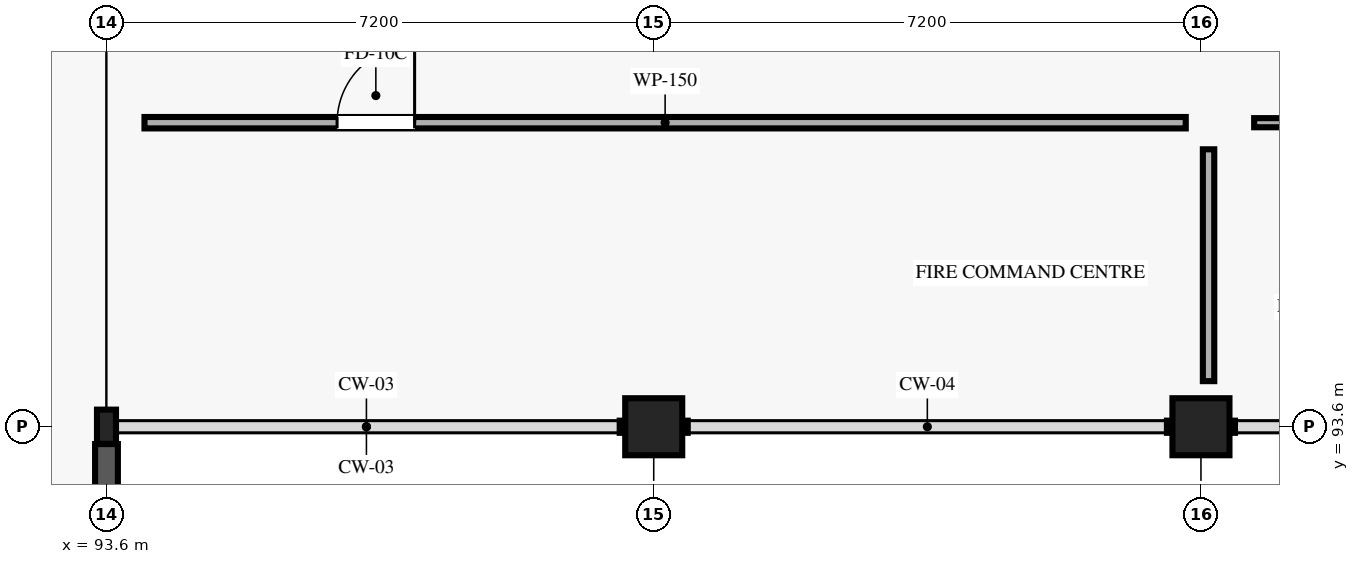
"""IFC4 building model, lengths in metres.
Left out: names, types, materials, properties, quantities, classifications, styles, units other than length and angle.
Written with IfcOpenShell. Run it as: python <this file> out.ifc"""

import sys

from ifc_helpers import new_model, si_unit, direction, frame, frame_2d, origin, origin_2d, place, context, subcontext, project, spatial, rectangle, i_section, extrude, element, fill, save


model = new_model("IFC4")
c1 = context("Model", 3, precision=1e-05, world=origin(), true_north=direction((0.0, 1.0)))
c2 = subcontext(c1, "Body", "Model", "MODEL_VIEW")
j1 = project(units=[si_unit("LENGTHUNIT", "METRE"), si_unit("PLANEANGLEUNIT", "RADIAN")], contexts=[c1])
p1 = place(None, origin())
s1 = spatial("IfcSite", under=j1, at=p1, CompositionType="ELEMENT")
p2 = place(p1, origin())
s2 = spatial("IfcBuilding", under=s1, at=p2, CompositionType="ELEMENT")
p3 = place(p2, origin())
s3 = spatial("IfcBuildingStorey", under=s2, at=p3, CompositionType="ELEMENT", Elevation=0.0)
p4 = place(p3, frame((93.6, 93.6, 0.0), z_axis=(0.0, 0.0, 1.0), x_axis=(1.0, 0.0, 0.0)))
e1 = element("IfcColumn", 1, at=p4, inside=s3, PredefinedType="COLUMN", context=c2, shape_type="SweptSolid", body=[
    extrude(i_section(OverallWidth=0.25, OverallDepth=0.45, WebThickness=0.011, FlangeThickness=0.014, at=origin_2d()), origin(), (0.0, 0.0, 1.0), 5.4),
])
for number, where, z_axis, x_axis in (
    (2, (100.8, 93.6, 0.0), (0.0, 0.0, 1.0), (1.0, 0.0, 0.0)),
    (3, (108.0, 93.6, 0.0), (0.0, 0.0, 1.0), (1.0, 0.0, 0.0)),
):
    element("IfcColumn", number, at=place(p3, frame(where, z_axis=z_axis, x_axis=x_axis)), inside=s3, PredefinedType="COLUMN", context=c2, shape_type="SweptSolid", body=[
        extrude(rectangle(XDim=0.75, YDim=0.75, at=origin_2d()), origin(), (0.0, 0.0, 1.0), 5.4),
    ])
p5 = place(p3, frame((93.6, 86.628, 0.0), z_axis=(0.0, 0.0, 1.0), x_axis=(0.0, 1.0, 0.0)))
e4 = element("IfcWall", 4, at=p5, inside=s3, PredefinedType="SOLIDWALL", context=c2, shape_type="SweptSolid", body=[
    extrude(rectangle(XDim=6.744, YDim=0.3, at=frame_2d((3.372, 0.0))), origin(), (0.0, 0.0, 1.0), 5.16),
])
p6 = place(p5, frame((2.622, 0.0, 0.85)))
e5 = element("IfcOpeningElement", 5, at=p6, cuts=e4, PredefinedType="OPENING", context=c2, shape_type="SweptSolid", body=[
    extrude(rectangle(XDim=1.5, YDim=2.05, at=frame_2d((0.75, 1.025))), frame((0.0, 0.16, 0.0), z_axis=(0.0, -1.0, 0.0), x_axis=(1.0, 0.0, 0.0)), (0.0, 0.0, 1.0), 0.32),
])
p7 = place(p3, frame((108.1, 94.2, 0.0), z_axis=(0.0, 0.0, 1.0), x_axis=(0.0, 1.0, 0.0)))
e6 = element("IfcWall", 6, at=p7, inside=s3, PredefinedType="PARTITIONING", context=c2, shape_type="SweptSolid", body=[
    extrude(rectangle(XDim=3.05, YDim=0.15, at=frame_2d((1.525, 0.0))), origin(), (0.0, 0.0, 1.0), 4.5),
])
p8 = place(p3, frame((94.1, 97.6, 0.0), z_axis=(0.0, 0.0, 1.0), x_axis=(1.0, 0.0, 0.0)))
e7 = element("IfcWall", 7, at=p8, inside=s3, PredefinedType="PARTITIONING", context=c2, shape_type="SweptSolid", body=[
    extrude(rectangle(XDim=13.7, YDim=0.15, at=frame_2d((6.85, 0.0))), origin(), (0.0, 0.0, 1.0), 5.16),
])
p9 = place(p8, frame((2.534, 0.0, 0.0)))
e8 = element("IfcOpeningElement", 8, at=p9, cuts=e7, PredefinedType="OPENING", context=c2, shape_type="SweptSolid", body=[
    extrude(rectangle(XDim=1.02, YDim=2.15, at=frame_2d((0.51, 1.075))), frame((0.0, 0.085, 0.0), z_axis=(0.0, -1.0, 0.0), x_axis=(1.0, 0.0, 0.0)), (0.0, 0.0, 1.0), 0.17),
])
p10 = place(p3, frame((108.7, 97.6, 0.0), z_axis=(0.0, 0.0, 1.0), x_axis=(1.0, 0.0, 0.0)))
e9 = element("IfcWall", 9, at=p10, inside=s3, PredefinedType="PARTITIONING", context=c2, shape_type="SweptSolid", body=[
    extrude(rectangle(XDim=35.15, YDim=0.12, at=frame_2d((17.575, 0.0))), origin(), (0.0, 0.0, 1.0), 5.16),
])
p11 = place(p10, frame((2.259, 0.0, 0.0)))
e10 = element("IfcOpeningElement", 10, at=p11, cuts=e9, PredefinedType="OPENING", context=c2, shape_type="SweptSolid", body=[
    extrude(rectangle(XDim=1.25, YDim=2.2, at=frame_2d((0.625, 1.1))), frame((0.0, 0.07, 0.0), z_axis=(0.0, -1.0, 0.0), x_axis=(1.0, 0.0, 0.0)), (0.0, 0.0, 1.0), 0.14),
])
p12 = place(p9, origin())
e11 = element("IfcDoor", 11, at=p12, inside=s3, OperationType="SINGLE_SWING_RIGHT", PredefinedType="DOOR", context=c2, shape_type="SweptSolid", body=[
    extrude(rectangle(XDim=1.02, YDim=2.15, at=frame_2d((0.51, 1.075))), frame((0.0, 0.025, 0.0), z_axis=(0.0, -1.0, 0.0), x_axis=(1.0, 0.0, 0.0)), (0.0, 0.0, 1.0), 0.05),
])
fill(e8, e11)
save(model, sys.argv[1])
